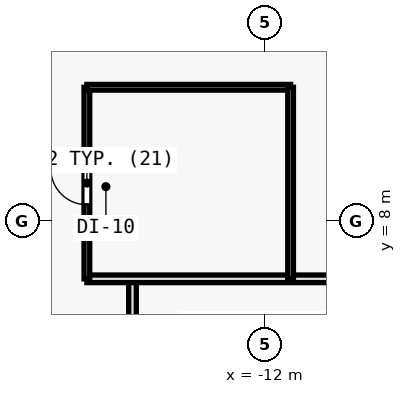
"""IFC4 building model, lengths in metres.
Left out: names, types, materials, properties, quantities, classifications, styles, units other than length and angle.
Written with IfcOpenShell. Run it as: python <this file> out.ifc"""

import sys

from ifc_helpers import new_model, si_unit, direction, frame, frame_2d, origin, place, context, subcontext, project, spatial, rectangle, extrude, element, fill, save


model = new_model("IFC4")
c1 = context("Model", 3, precision=1e-05, world=origin(), true_north=direction((0.0, 1.0)))
c2 = subcontext(c1, "Body", "Model", "MODEL_VIEW")
j1 = project(units=[si_unit("LENGTHUNIT", "METRE"), si_unit("PLANEANGLEUNIT", "RADIAN")], contexts=[c1])
p1 = place(None, origin())
s1 = spatial("IfcSite", under=j1, at=p1, CompositionType="ELEMENT")
p2 = place(p1, origin())
s2 = spatial("IfcBuilding", under=s1, at=p2, CompositionType="ELEMENT")
p3 = place(p2, origin())
s3 = spatial("IfcBuildingStorey", under=s2, at=p3, CompositionType="ELEMENT", Elevation=0.0)
p4 = place(p3, frame((-15.48, 2.08, 0.0), z_axis=(0.0, 0.0, 1.0), x_axis=(0.0, 1.0, 0.0)))
e1 = element("IfcWall", 1, at=p4, inside=s3, PredefinedType="SOLIDWALL", context=c2, shape_type="SweptSolid", body=[
    extrude(rectangle(XDim=4.4, YDim=0.2, at=frame_2d((2.2, 0.0))), origin(), (0.0, 0.0, 1.0), 3.881),
])
p5 = place(p4, frame((1.6, 0.0, 0.0)))
e2 = element("IfcOpeningElement", 2, at=p5, cuts=e1, PredefinedType="OPENING", context=c2, shape_type="SweptSolid", body=[
    extrude(rectangle(XDim=1.0, YDim=2.15, at=frame_2d((0.5, 1.075))), frame((0.0, 0.11, 0.0), z_axis=(0.0, -1.0, 0.0), x_axis=(1.0, 0.0, 0.0)), (0.0, 0.0, 1.0), 0.22),
])
p6 = place(p3, frame((-16.68, 6.48, 0.0), z_axis=(0.0, 0.0, 1.0), x_axis=(1.0, 0.0, 0.0)))
e3 = element("IfcWall", 3, at=p6, inside=s3, PredefinedType="SOLIDWALL", context=c2, shape_type="SweptSolid", body=[
    extrude(rectangle(XDim=8.68, YDim=0.2, at=frame_2d((4.34, 0.0))), origin(), (0.0, 0.0, 1.0), 4.72),
])
p7 = place(p3, frame((-16.68, 6.48, 0.0), z_axis=(0.0, 0.0, 1.0), x_axis=(0.0, 1.0, 0.0)))
e4 = element("IfcWall", 4, at=p7, inside=s3, PredefinedType="PARTITIONING", context=c2, shape_type="SweptSolid", body=[
    extrude(rectangle(XDim=5.04, YDim=0.15, at=frame_2d((2.52, 0.0))), origin(), (0.0, 0.0, 1.0), 4.72),
])
p8 = place(p7, frame((1.95, 0.0, 0.0)))
e5 = element("IfcOpeningElement", 5, at=p8, cuts=e4, PredefinedType="OPENING", context=c2, shape_type="SweptSolid", body=[
    extrude(rectangle(XDim=0.95, YDim=2.1, at=frame_2d((0.475, 1.05))), frame((0.0, 0.085, 0.0), z_axis=(0.0, -1.0, 0.0), x_axis=(1.0, 0.0, 0.0)), (0.0, 0.0, 1.0), 0.17),
])
p9 = place(p3, frame((-16.68, 11.52, 0.0), z_axis=(0.0, 0.0, 1.0), x_axis=(1.0, 0.0, 0.0)))
e6 = element("IfcWall", 6, at=p9, inside=s3, PredefinedType="PARTITIONING", context=c2, shape_type="SweptSolid", body=[
    extrude(rectangle(XDim=5.36, YDim=0.15, at=frame_2d((2.68, 0.0))), origin(), (0.0, 0.0, 1.0), 4.72),
])
p10 = place(p3, frame((-11.32, 6.48, 0.0), z_axis=(0.0, 0.0, 1.0), x_axis=(0.0, 1.0, 0.0)))
e7 = element("IfcWall", 7, at=p10, inside=s3, PredefinedType="PARTITIONING", context=c2, shape_type="SweptSolid", body=[
    extrude(rectangle(XDim=5.04, YDim=0.15, at=frame_2d((2.52, 0.0))), origin(), (0.0, 0.0, 1.0), 4.72),
])
p11 = place(p8, origin())
e8 = element("IfcDoor", 8, at=p11, inside=s3, OperationType="SINGLE_SWING_RIGHT", PredefinedType="DOOR", context=c2, shape_type="SweptSolid", body=[
    extrude(rectangle(XDim=0.95, YDim=2.1, at=frame_2d((0.475, 1.05))), frame((0.0, 0.025, 0.0), z_axis=(0.0, -1.0, 0.0), x_axis=(1.0, 0.0, 0.0)), (0.0, 0.0, 1.0), 0.05),
])
fill(e5, e8)
save(model, sys.argv[1])
